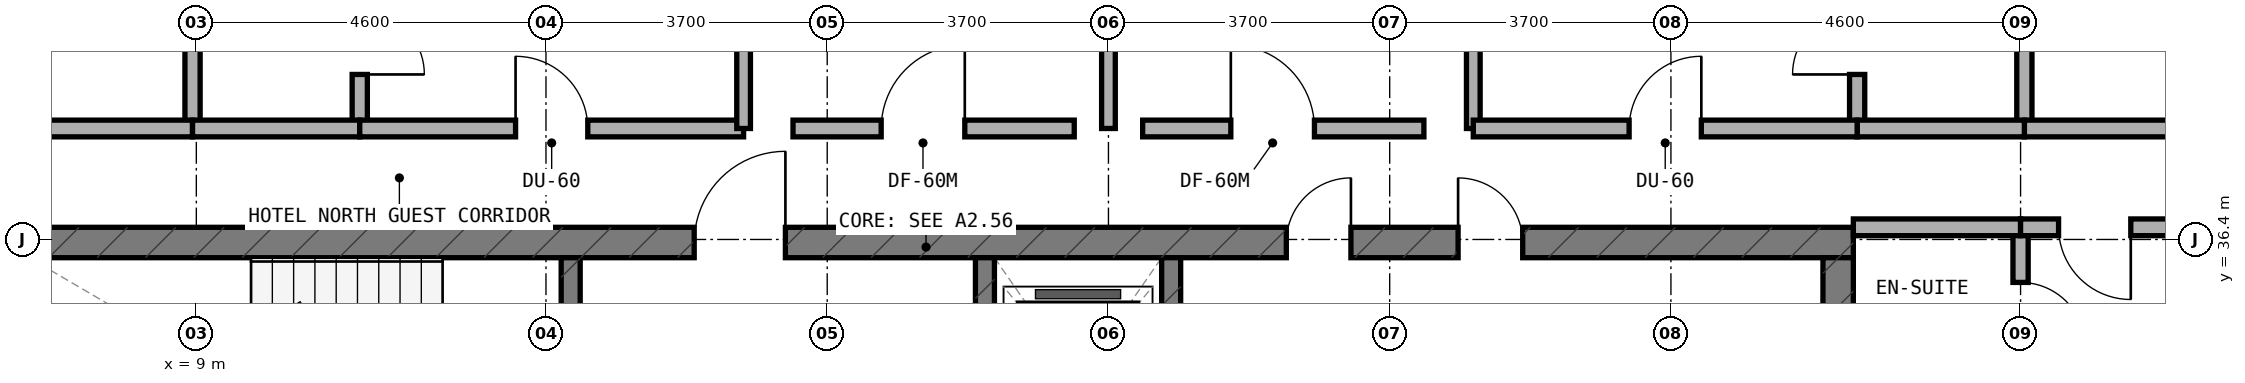
"""IFC4 building model, lengths in metres.
Left out: names, types, materials, properties, quantities, classifications, styles, units other than length and angle.
Written with IfcOpenShell. Run it as: python <this file> out.ifc"""

import sys

from ifc_helpers import new_model, si_unit, direction, frame, frame_2d, origin, place, context, subcontext, project, spatial, rectangle, extrude, element, fill, save


model = new_model("IFC4")
c1 = context("Model", 3, precision=1e-05, world=origin(), true_north=direction((0.0, 1.0)))
c2 = subcontext(c1, "Body", "Model", "MODEL_VIEW")
j1 = project(units=[si_unit("LENGTHUNIT", "METRE"), si_unit("PLANEANGLEUNIT", "RADIAN")], contexts=[c1])
p1 = place(None, origin())
s1 = spatial("IfcSite", under=j1, at=p1, CompositionType="ELEMENT")
p2 = place(p1, origin())
s2 = spatial("IfcBuilding", under=s1, at=p2, CompositionType="ELEMENT")
p3 = place(p2, frame((0.0, 0.0, 257.6)))
s3 = spatial("IfcBuildingStorey", under=s2, at=p3, CompositionType="ELEMENT", Elevation=257.6)
p4 = place(p3, frame((6.4, 36.36, 0.0), z_axis=(0.0, 0.0, 1.0), x_axis=(1.0, 0.0, 0.0)))
e1 = element("IfcWall", 1, at=p4, inside=s3, PredefinedType="SHEAR", context=c2, shape_type="SweptSolid", body=[
    extrude(rectangle(XDim=24.4, YDim=0.4, at=frame_2d((12.2, 0.0))), origin(), (0.0, 0.0, 1.0), 3.6),
])
p5 = place(p4, frame((9.15, 0.0, 0.0)))
e2 = element("IfcOpeningElement", 2, at=p5, cuts=e1, PredefinedType="OPENING", context=c2, shape_type="SweptSolid", body=[
    extrude(rectangle(XDim=1.2, YDim=2.15, at=frame_2d((0.6, 1.075))), frame((0.0, 0.21, 0.0), z_axis=(0.0, -1.0, 0.0), x_axis=(1.0, 0.0, 0.0)), (0.0, 0.0, 1.0), 0.42),
])
p6 = place(p4, frame((19.2, 0.0, 0.0)))
e3 = element("IfcOpeningElement", 3, at=p6, cuts=e1, PredefinedType="OPENING", context=c2, shape_type="SweptSolid", body=[
    extrude(rectangle(XDim=0.85, YDim=2.1, at=frame_2d((0.425, 1.05))), frame((0.0, 0.21, 0.0), z_axis=(0.0, -1.0, 0.0), x_axis=(1.0, 0.0, 0.0)), (0.0, 0.0, 1.0), 0.42),
])
p7 = place(p4, frame((16.94, 0.0, 0.0)))
e4 = element("IfcOpeningElement", 4, at=p7, cuts=e1, PredefinedType="OPENING", context=c2, shape_type="SweptSolid", body=[
    extrude(rectangle(XDim=0.85, YDim=2.1, at=frame_2d((0.425, 1.05))), frame((0.0, 0.21, 0.0), z_axis=(0.0, -1.0, 0.0), x_axis=(1.0, 0.0, 0.0)), (0.0, 0.0, 1.0), 0.42),
])
p8 = place(p3, frame((30.6, 33.0, 0.0), z_axis=(0.0, 0.0, 1.0), x_axis=(0.0, 1.0, 0.0)))
e5 = element("IfcWall", 5, at=p8, inside=s3, PredefinedType="SHEAR", context=c2, shape_type="SweptSolid", body=[
    extrude(rectangle(XDim=3.16, YDim=0.4, at=frame_2d((1.58, 0.0))), origin(), (0.0, 0.0, 1.0), 3.6),
])
p9 = place(p3, frame((13.925, 33.0, 0.0), z_axis=(0.0, 0.0, 1.0), x_axis=(0.0, 1.0, 0.0)))
e6 = element("IfcWall", 6, at=p9, inside=s3, PredefinedType="STANDARD", context=c2, shape_type="SweptSolid", body=[
    extrude(rectangle(XDim=3.16, YDim=0.25, at=frame_2d((1.58, 0.0))), origin(), (0.0, 0.0, 1.0), 3.32),
])
p10 = place(p9, frame((0.98, 0.0, 0.0)))
e7 = element("IfcOpeningElement", 7, at=p10, cuts=e6, PredefinedType="OPENING", context=c2, shape_type="SweptSolid", body=[
    extrude(rectangle(XDim=1.1, YDim=2.15, at=frame_2d((0.55, 1.075))), frame((0.0, 0.135, 0.0), z_axis=(0.0, -1.0, 0.0), x_axis=(1.0, 0.0, 0.0)), (0.0, 0.0, 1.0), 0.27),
])
p11 = place(p3, frame((19.375, 33.0, 0.0), z_axis=(0.0, 0.0, 1.0), x_axis=(0.0, 1.0, 0.0)))
e8 = element("IfcWall", 8, at=p11, inside=s3, PredefinedType="STANDARD", context=c2, shape_type="SweptSolid", body=[
    extrude(rectangle(XDim=3.16, YDim=0.25, at=frame_2d((1.58, 0.0))), origin(), (0.0, 0.0, 1.0), 3.32),
])
p12 = place(p11, frame((0.98, 0.0, 0.0)))
e9 = element("IfcOpeningElement", 9, at=p12, cuts=e8, PredefinedType="OPENING", context=c2, shape_type="SweptSolid", body=[
    extrude(rectangle(XDim=1.1, YDim=2.15, at=frame_2d((0.55, 1.075))), frame((0.0, 0.135, 0.0), z_axis=(0.0, -1.0, 0.0), x_axis=(1.0, 0.0, 0.0)), (0.0, 0.0, 1.0), 0.27),
])
p13 = place(p3, frame((21.825, 33.0, 0.0), z_axis=(0.0, 0.0, 1.0), x_axis=(0.0, 1.0, 0.0)))
e10 = element("IfcWall", 10, at=p13, inside=s3, PredefinedType="STANDARD", context=c2, shape_type="SweptSolid", body=[
    extrude(rectangle(XDim=3.16, YDim=0.25, at=frame_2d((1.58, 0.0))), origin(), (0.0, 0.0, 1.0), 3.32),
])
p14 = place(p3, frame((11.15, 37.96, 0.0), z_axis=(0.0, 0.0, 1.0), x_axis=(0.0, 1.0, 0.0)))
e11 = element("IfcWall", 11, at=p14, inside=s3, PredefinedType="PLUMBINGWALL", context=c2, shape_type="SweptSolid", body=[
    extrude(rectangle(XDim=2.072, YDim=0.2, at=frame_2d((1.036, 0.0))), origin(), (0.0, 0.0, 1.0), 2.895),
])
p15 = place(p14, frame((0.611, 0.0, 0.0)))
e12 = element("IfcOpeningElement", 12, at=p15, cuts=e11, PredefinedType="OPENING", context=c2, shape_type="SweptSolid", body=[
    extrude(rectangle(XDim=0.85, YDim=2.1, at=frame_2d((0.425, 1.05))), frame((0.0, 0.11, 0.0), z_axis=(0.0, -1.0, 0.0), x_axis=(1.0, 0.0, 0.0)), (0.0, 0.0, 1.0), 0.22),
])
p16 = place(p3, frame((8.95, 37.96, 0.0), z_axis=(0.0, 0.0, 1.0), x_axis=(0.0, 1.0, 0.0)))
e13 = element("IfcWall", 13, at=p16, inside=s3, PredefinedType="PLUMBINGWALL", context=c2, shape_type="SweptSolid", body=[
    extrude(rectangle(XDim=2.072, YDim=0.2, at=frame_2d((1.036, 0.0))), origin(), (0.0, 0.0, 1.0), 2.895),
])
p17 = place(p3, frame((3.96, 37.86, 0.0), z_axis=(0.0, 0.0, 1.0), x_axis=(1.0, 0.0, 0.0)))
e14 = element("IfcWall", 14, at=p17, inside=s3, PredefinedType="SOLIDWALL", context=c2, shape_type="SweptSolid", body=[
    extrude(rectangle(XDim=4.99, YDim=0.22, at=frame_2d((2.495, 0.0))), origin(), (0.0, 0.0, 1.0), 2.795),
])
p18 = place(p3, frame((8.95, 37.86, 0.0), z_axis=(0.0, 0.0, 1.0), x_axis=(1.0, 0.0, 0.0)))
e15 = element("IfcWall", 15, at=p18, inside=s3, PredefinedType="SOLIDWALL", context=c2, shape_type="SweptSolid", body=[
    extrude(rectangle(XDim=2.2, YDim=0.22, at=frame_2d((1.1, 0.0))), origin(), (0.0, 0.0, 1.0), 3.32),
])
p19 = place(p3, frame((11.15, 37.86, 0.0), z_axis=(0.0, 0.0, 1.0), x_axis=(1.0, 0.0, 0.0)))
e16 = element("IfcWall", 16, at=p19, inside=s3, PredefinedType="SOLIDWALL", context=c2, shape_type="SweptSolid", body=[
    extrude(rectangle(XDim=5.05, YDim=0.22, at=frame_2d((2.525, 0.0))), origin(), (0.0, 0.0, 1.0), 2.795),
])
p20 = place(p19, frame((2.05, 0.0, 0.0)))
e17 = element("IfcOpeningElement", 17, at=p20, cuts=e16, PredefinedType="OPENING", context=c2, shape_type="SweptSolid", body=[
    extrude(rectangle(XDim=0.95, YDim=2.1, at=frame_2d((0.475, 1.05))), frame((0.0, 0.12, 0.0), z_axis=(0.0, -1.0, 0.0), x_axis=(1.0, 0.0, 0.0)), (0.0, 0.0, 1.0), 0.24),
])
p21 = place(p3, frame((16.2, 37.86, 0.0), z_axis=(0.0, 0.0, 1.0), x_axis=(0.0, 1.0, 0.0)))
e18 = element("IfcWall", 18, at=p21, inside=s3, PredefinedType="SOLIDWALL", context=c2, shape_type="SweptSolid", body=[
    extrude(rectangle(XDim=4.88, YDim=0.18, at=frame_2d((2.44, 0.0))), origin(), (0.0, 0.0, 1.0), 2.795),
])
p22 = place(p3, frame((21.0, 37.86, 0.0), z_axis=(0.0, 0.0, 1.0), x_axis=(0.0, 1.0, 0.0)))
e19 = element("IfcWall", 19, at=p22, inside=s3, PredefinedType="SOLIDWALL", context=c2, shape_type="SweptSolid", body=[
    extrude(rectangle(XDim=4.88, YDim=0.18, at=frame_2d((2.44, 0.0))), origin(), (0.0, 0.0, 1.0), 2.895),
])
p23 = place(p3, frame((16.85, 37.86, 0.0), z_axis=(0.0, 0.0, 1.0), x_axis=(1.0, 0.0, 0.0)))
e20 = element("IfcWall", 20, at=p23, inside=s3, PredefinedType="SOLIDWALL", context=c2, shape_type="SweptSolid", body=[
    extrude(rectangle(XDim=3.7, YDim=0.22, at=frame_2d((1.85, 0.0))), origin(), (0.0, 0.0, 1.0), 3.32),
])
p24 = place(p23, frame((1.16, 0.0, 0.0)))
e21 = element("IfcOpeningElement", 21, at=p24, cuts=e20, PredefinedType="OPENING", context=c2, shape_type="SweptSolid", body=[
    extrude(rectangle(XDim=1.1, YDim=2.1, at=frame_2d((0.55, 1.05))), frame((0.0, 0.12, 0.0), z_axis=(0.0, -1.0, 0.0), x_axis=(1.0, 0.0, 0.0)), (0.0, 0.0, 1.0), 0.24),
])
p25 = place(p3, frame((21.45, 37.86, 0.0), z_axis=(0.0, 0.0, 1.0), x_axis=(1.0, 0.0, 0.0)))
e22 = element("IfcWall", 22, at=p25, inside=s3, PredefinedType="SOLIDWALL", context=c2, shape_type="SweptSolid", body=[
    extrude(rectangle(XDim=3.7, YDim=0.22, at=frame_2d((1.85, 0.0))), origin(), (0.0, 0.0, 1.0), 3.32),
])
p26 = place(p25, frame((1.16, 0.0, 0.0)))
e23 = element("IfcOpeningElement", 23, at=p26, cuts=e22, PredefinedType="OPENING", context=c2, shape_type="SweptSolid", body=[
    extrude(rectangle(XDim=1.1, YDim=2.1, at=frame_2d((0.55, 1.05))), frame((0.0, 0.12, 0.0), z_axis=(0.0, -1.0, 0.0), x_axis=(1.0, 0.0, 0.0)), (0.0, 0.0, 1.0), 0.24),
])
p27 = place(p3, frame((25.8, 37.86, 0.0), z_axis=(0.0, 0.0, 1.0), x_axis=(0.0, 1.0, 0.0)))
e24 = element("IfcWall", 24, at=p27, inside=s3, PredefinedType="SOLIDWALL", context=c2, shape_type="SweptSolid", body=[
    extrude(rectangle(XDim=4.88, YDim=0.18, at=frame_2d((2.44, 0.0))), origin(), (0.0, 0.0, 1.0), 2.795),
])
p28 = place(p3, frame((30.85, 37.96, 0.0), z_axis=(0.0, 0.0, 1.0), x_axis=(0.0, 1.0, 0.0)))
e25 = element("IfcWall", 25, at=p28, inside=s3, PredefinedType="PLUMBINGWALL", context=c2, shape_type="SweptSolid", body=[
    extrude(rectangle(XDim=2.072, YDim=0.2, at=frame_2d((1.036, 0.0))), origin(), (0.0, 0.0, 1.0), 2.895),
])
p29 = place(p28, frame((0.611, 0.0, 0.0)))
e26 = element("IfcOpeningElement", 26, at=p29, cuts=e25, PredefinedType="OPENING", context=c2, shape_type="SweptSolid", body=[
    extrude(rectangle(XDim=0.85, YDim=2.1, at=frame_2d((0.425, 1.05))), frame((0.0, 0.11, 0.0), z_axis=(0.0, -1.0, 0.0), x_axis=(1.0, 0.0, 0.0)), (0.0, 0.0, 1.0), 0.22),
])
p30 = place(p3, frame((33.05, 37.96, 0.0), z_axis=(0.0, 0.0, 1.0), x_axis=(0.0, 1.0, 0.0)))
e27 = element("IfcWall", 27, at=p30, inside=s3, PredefinedType="PLUMBINGWALL", context=c2, shape_type="SweptSolid", body=[
    extrude(rectangle(XDim=2.072, YDim=0.2, at=frame_2d((1.036, 0.0))), origin(), (0.0, 0.0, 1.0), 2.895),
])
p31 = place(p3, frame((33.05, 37.86, 0.0), z_axis=(0.0, 0.0, 1.0), x_axis=(1.0, 0.0, 0.0)))
e28 = element("IfcWall", 28, at=p31, inside=s3, PredefinedType="SOLIDWALL", context=c2, shape_type="SweptSolid", body=[
    extrude(rectangle(XDim=4.99, YDim=0.22, at=frame_2d((2.495, 0.0))), origin(), (0.0, 0.0, 1.0), 2.795),
])
p32 = place(p3, frame((30.85, 37.86, 0.0), z_axis=(0.0, 0.0, 1.0), x_axis=(1.0, 0.0, 0.0)))
e29 = element("IfcWall", 29, at=p32, inside=s3, PredefinedType="SOLIDWALL", context=c2, shape_type="SweptSolid", body=[
    extrude(rectangle(XDim=2.2, YDim=0.22, at=frame_2d((1.1, 0.0))), origin(), (0.0, 0.0, 1.0), 3.32),
])
p33 = place(p3, frame((25.8, 37.86, 0.0), z_axis=(0.0, 0.0, 1.0), x_axis=(1.0, 0.0, 0.0)))
e30 = element("IfcWall", 30, at=p33, inside=s3, PredefinedType="SOLIDWALL", context=c2, shape_type="SweptSolid", body=[
    extrude(rectangle(XDim=5.05, YDim=0.22, at=frame_2d((2.525, 0.0))), origin(), (0.0, 0.0, 1.0), 2.795),
])
p34 = place(p33, frame((2.05, 0.0, 0.0)))
e31 = element("IfcOpeningElement", 31, at=p34, cuts=e30, PredefinedType="OPENING", context=c2, shape_type="SweptSolid", body=[
    extrude(rectangle(XDim=0.95, YDim=2.1, at=frame_2d((0.475, 1.05))), frame((0.0, 0.12, 0.0), z_axis=(0.0, -1.0, 0.0), x_axis=(1.0, 0.0, 0.0)), (0.0, 0.0, 1.0), 0.24),
])
p35 = place(p3, frame((33.0, 34.36, 0.0), z_axis=(0.0, 0.0, 1.0), x_axis=(0.0, 1.0, 0.0)))
e32 = element("IfcWall", 32, at=p35, inside=s3, PredefinedType="PLUMBINGWALL", context=c2, shape_type="SweptSolid", body=[
    extrude(rectangle(XDim=2.1, YDim=0.2, at=frame_2d((1.05, 0.0))), origin(), (0.0, 0.0, 1.0), 3.32),
])
p36 = place(p35, frame((0.625, 0.0, 0.0)))
e33 = element("IfcOpeningElement", 33, at=p36, cuts=e32, PredefinedType="OPENING", context=c2, shape_type="SweptSolid", body=[
    extrude(rectangle(XDim=0.85, YDim=2.1, at=frame_2d((0.425, 1.05))), frame((0.0, 0.11, 0.0), z_axis=(0.0, -1.0, 0.0), x_axis=(1.0, 0.0, 0.0)), (0.0, 0.0, 1.0), 0.22),
])
p37 = place(p3, frame((30.8, 36.56, 0.0), z_axis=(0.0, 0.0, 1.0), x_axis=(1.0, 0.0, 0.0)))
e34 = element("IfcWall", 34, at=p37, inside=s3, PredefinedType="SOLIDWALL", context=c2, shape_type="SweptSolid", body=[
    extrude(rectangle(XDim=2.2, YDim=0.22, at=frame_2d((1.1, 0.0))), origin(), (0.0, 0.0, 1.0), 3.32),
])
p38 = place(p3, frame((33.0, 36.56, 0.0), z_axis=(0.0, 0.0, 1.0), x_axis=(1.0, 0.0, 0.0)))
e35 = element("IfcWall", 35, at=p38, inside=s3, PredefinedType="SOLIDWALL", context=c2, shape_type="SweptSolid", body=[
    extrude(rectangle(XDim=5.2, YDim=0.22, at=frame_2d((2.6, 0.0))), origin(), (0.0, 0.0, 1.0), 2.795),
])
p39 = place(p38, frame((0.5, 0.0, 0.0)))
e36 = element("IfcOpeningElement", 36, at=p39, cuts=e35, PredefinedType="OPENING", context=c2, shape_type="SweptSolid", body=[
    extrude(rectangle(XDim=0.95, YDim=2.1, at=frame_2d((0.475, 1.05))), frame((0.0, 0.12, 0.0), z_axis=(0.0, -1.0, 0.0), x_axis=(1.0, 0.0, 0.0)), (0.0, 0.0, 1.0), 0.24),
])
p40 = place(p5, origin())
e37 = element("IfcDoor", 37, at=p40, inside=s3, OperationType="SINGLE_SWING_RIGHT", PredefinedType="DOOR", context=c2, shape_type="SweptSolid", body=[
    extrude(rectangle(XDim=1.2, YDim=2.15, at=frame_2d((0.6, 1.075))), frame((0.0, 0.025, 0.0), z_axis=(0.0, -1.0, 0.0), x_axis=(1.0, 0.0, 0.0)), (0.0, 0.0, 1.0), 0.05),
])
fill(e2, e37)
p41 = place(p6, origin())
e38 = element("IfcDoor", 38, at=p41, inside=s3, OperationType="SINGLE_SWING_LEFT", PredefinedType="DOOR", context=c2, shape_type="SweptSolid", body=[
    extrude(rectangle(XDim=0.85, YDim=2.1, at=frame_2d((0.425, 1.05))), frame((0.0, 0.025, 0.0), z_axis=(0.0, -1.0, 0.0), x_axis=(1.0, 0.0, 0.0)), (0.0, 0.0, 1.0), 0.05),
])
fill(e3, e38)
p42 = place(p7, origin())
e39 = element("IfcDoor", 39, at=p42, inside=s3, OperationType="SINGLE_SWING_RIGHT", PredefinedType="DOOR", context=c2, shape_type="SweptSolid", body=[
    extrude(rectangle(XDim=0.85, YDim=2.1, at=frame_2d((0.425, 1.05))), frame((0.0, 0.025, 0.0), z_axis=(0.0, -1.0, 0.0), x_axis=(1.0, 0.0, 0.0)), (0.0, 0.0, 1.0), 0.05),
])
fill(e4, e39)
p43 = place(p15, frame((0.85, 0.0, 0.0), z_axis=(0.0, 0.0, 1.0), x_axis=(-1.0, 0.0, 0.0)))
e40 = element("IfcDoor", 40, at=p43, inside=s3, OperationType="SINGLE_SWING_RIGHT", PredefinedType="DOOR", context=c2, shape_type="SweptSolid", body=[
    extrude(rectangle(XDim=0.85, YDim=2.1, at=frame_2d((0.425, 1.05))), frame((0.0, 0.025, 0.0), z_axis=(0.0, -1.0, 0.0), x_axis=(1.0, 0.0, 0.0)), (0.0, 0.0, 1.0), 0.05),
])
fill(e12, e40)
p44 = place(p20, origin())
e41 = element("IfcDoor", 41, at=p44, inside=s3, OperationType="SINGLE_SWING_LEFT", PredefinedType="DOOR", context=c2, shape_type="SweptSolid", body=[
    extrude(rectangle(XDim=0.95, YDim=2.1, at=frame_2d((0.475, 1.05))), frame((0.0, 0.025, 0.0), z_axis=(0.0, -1.0, 0.0), x_axis=(1.0, 0.0, 0.0)), (0.0, 0.0, 1.0), 0.05),
])
fill(e17, e41)
p45 = place(p24, origin())
e42 = element("IfcDoor", 42, at=p45, inside=s3, OperationType="SINGLE_SWING_RIGHT", PredefinedType="DOOR", context=c2, shape_type="SweptSolid", body=[
    extrude(rectangle(XDim=1.1, YDim=2.1, at=frame_2d((0.55, 1.05))), frame((0.0, 0.025, 0.0), z_axis=(0.0, -1.0, 0.0), x_axis=(1.0, 0.0, 0.0)), (0.0, 0.0, 1.0), 0.05),
])
fill(e21, e42)
p46 = place(p26, origin())
e43 = element("IfcDoor", 43, at=p46, inside=s3, OperationType="SINGLE_SWING_LEFT", PredefinedType="DOOR", context=c2, shape_type="SweptSolid", body=[
    extrude(rectangle(XDim=1.1, YDim=2.1, at=frame_2d((0.55, 1.05))), frame((0.0, 0.025, 0.0), z_axis=(0.0, -1.0, 0.0), x_axis=(1.0, 0.0, 0.0)), (0.0, 0.0, 1.0), 0.05),
])
fill(e23, e43)
p47 = place(p29, origin())
e44 = element("IfcDoor", 44, at=p47, inside=s3, OperationType="SINGLE_SWING_LEFT", PredefinedType="DOOR", context=c2, shape_type="SweptSolid", body=[
    extrude(rectangle(XDim=0.85, YDim=2.1, at=frame_2d((0.425, 1.05))), frame((0.0, 0.025, 0.0), z_axis=(0.0, -1.0, 0.0), x_axis=(1.0, 0.0, 0.0)), (0.0, 0.0, 1.0), 0.05),
])
fill(e26, e44)
p48 = place(p34, origin())
e45 = element("IfcDoor", 45, at=p48, inside=s3, OperationType="SINGLE_SWING_RIGHT", PredefinedType="DOOR", context=c2, shape_type="SweptSolid", body=[
    extrude(rectangle(XDim=0.95, YDim=2.1, at=frame_2d((0.475, 1.05))), frame((0.0, 0.025, 0.0), z_axis=(0.0, -1.0, 0.0), x_axis=(1.0, 0.0, 0.0)), (0.0, 0.0, 1.0), 0.05),
])
fill(e31, e45)
p49 = place(p36, frame((0.85, 0.0, 0.0), z_axis=(0.0, 0.0, 1.0), x_axis=(-1.0, 0.0, 0.0)))
e46 = element("IfcDoor", 46, at=p49, inside=s3, OperationType="SINGLE_SWING_RIGHT", PredefinedType="DOOR", context=c2, shape_type="SweptSolid", body=[
    extrude(rectangle(XDim=0.85, YDim=2.1, at=frame_2d((0.425, 1.05))), frame((0.0, 0.025, 0.0), z_axis=(0.0, -1.0, 0.0), x_axis=(1.0, 0.0, 0.0)), (0.0, 0.0, 1.0), 0.05),
])
fill(e33, e46)
p50 = place(p39, frame((0.95, 0.0, 0.0), z_axis=(0.0, 0.0, 1.0), x_axis=(-1.0, 0.0, 0.0)))
e47 = element("IfcDoor", 47, at=p50, inside=s3, OperationType="SINGLE_SWING_LEFT", PredefinedType="DOOR", context=c2, shape_type="SweptSolid", body=[
    extrude(rectangle(XDim=0.95, YDim=2.1, at=frame_2d((0.475, 1.05))), frame((0.0, 0.025, 0.0), z_axis=(0.0, -1.0, 0.0), x_axis=(1.0, 0.0, 0.0)), (0.0, 0.0, 1.0), 0.05),
])
fill(e36, e47)
save(model, sys.argv[1])
